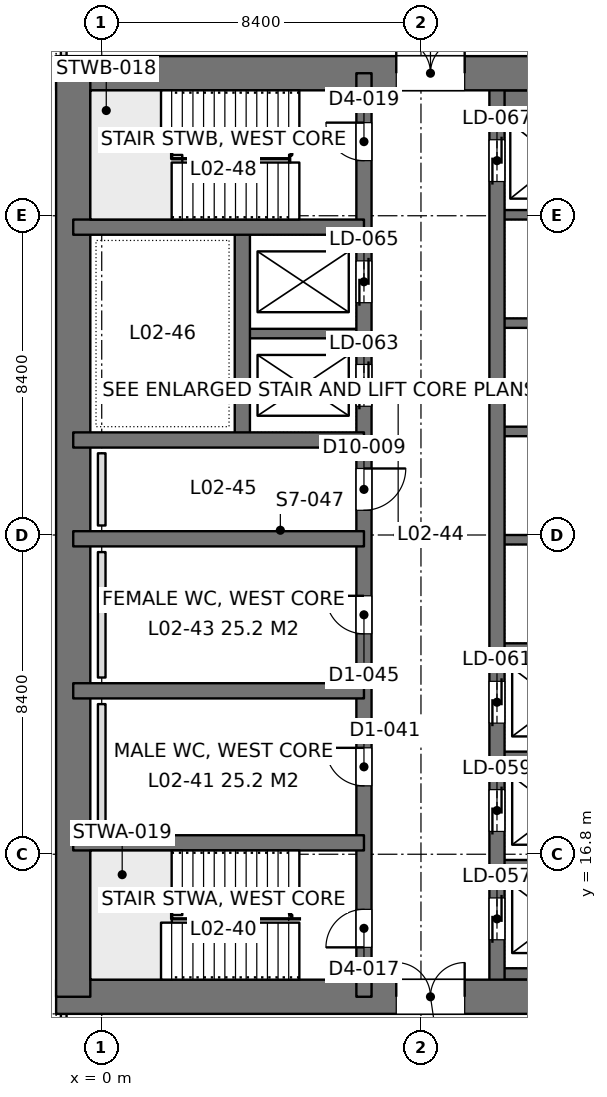
"""IFC4 building model, lengths in metres.
Left out: names, types, materials, properties, quantities, classifications, styles, units other than length and angle.
Written with IfcOpenShell. Run it as: python <this file> out.ifc"""

import sys

from ifc_helpers import new_model, si_unit, direction, frame, frame_2d, origin, place, context, subcontext, project, spatial, rectangle, extrude, element, fill, save


model = new_model("IFC4")
c1 = context("Model", 3, precision=1e-05, world=origin(), true_north=direction((0.0, 1.0)))
c2 = subcontext(c1, "Body", "Model", "MODEL_VIEW")
j1 = project(units=[si_unit("LENGTHUNIT", "METRE"), si_unit("PLANEANGLEUNIT", "RADIAN")], contexts=[c1])
p1 = place(None, origin())
s1 = spatial("IfcSite", under=j1, at=p1, CompositionType="ELEMENT")
p2 = place(p1, origin())
s2 = spatial("IfcBuilding", under=s1, at=p2, CompositionType="ELEMENT")
p3 = place(p2, frame((0.0, 0.0, 9.9)))
s3 = spatial("IfcBuildingStorey", under=s2, at=p3, CompositionType="ELEMENT", Elevation=9.9)
p4 = place(p3, frame((-1.2, 13.05, 0.0), z_axis=(0.0, 0.0, 1.0), x_axis=(1.0, 0.0, 0.0)))
e1 = element("IfcWall", 1, at=p4, inside=s3, PredefinedType="SHEAR", context=c2, shape_type="SweptSolid", body=[
    extrude(rectangle(XDim=18.0, YDim=0.9, at=frame_2d((9.0, 0.0))), origin(), (0.0, 0.0, 1.0), 4.5),
])
p5 = place(p4, frame((8.95, 0.0, 0.0)))
e2 = element("IfcOpeningElement", 2, at=p5, cuts=e1, PredefinedType="OPENING", context=c2, shape_type="SweptSolid", body=[
    extrude(rectangle(XDim=1.8, YDim=2.4, at=frame_2d((0.9, 1.2))), frame((0.0, 0.46, 0.0), z_axis=(0.0, -1.0, 0.0), x_axis=(1.0, 0.0, 0.0)), (0.0, 0.0, 1.0), 0.92),
])
p6 = place(p3, frame((-1.2, 37.35, 0.0), z_axis=(0.0, 0.0, 1.0), x_axis=(1.0, 0.0, 0.0)))
e3 = element("IfcWall", 3, at=p6, inside=s3, PredefinedType="SHEAR", context=c2, shape_type="SweptSolid", body=[
    extrude(rectangle(XDim=18.0, YDim=0.9, at=frame_2d((9.0, 0.0))), origin(), (0.0, 0.0, 1.0), 4.5),
])
p7 = place(p6, frame((8.95, 0.0, 0.0)))
e4 = element("IfcOpeningElement", 4, at=p7, cuts=e3, PredefinedType="OPENING", context=c2, shape_type="SweptSolid", body=[
    extrude(rectangle(XDim=1.8, YDim=2.4, at=frame_2d((0.9, 1.2))), frame((0.0, 0.46, 0.0), z_axis=(0.0, -1.0, 0.0), x_axis=(1.0, 0.0, 0.0)), (0.0, 0.0, 1.0), 0.92),
])
p8 = place(p3, frame((-0.75, 13.05, 0.0), z_axis=(0.0, 0.0, 1.0), x_axis=(0.0, 1.0, 0.0)))
e5 = element("IfcWall", 5, at=p8, inside=s3, PredefinedType="SHEAR", context=c2, shape_type="SweptSolid", body=[
    extrude(rectangle(XDim=24.3, YDim=0.9, at=frame_2d((12.15, 0.0))), origin(), (0.0, 0.0, 1.0), 4.5),
])
p9 = place(p3, frame((6.9, 13.05, 0.0), z_axis=(0.0, 0.0, 1.0), x_axis=(0.0, 1.0, 0.0)))
e6 = element("IfcWall", 6, at=p9, inside=s3, PredefinedType="SHEAR", context=c2, shape_type="SweptSolid", body=[
    extrude(rectangle(XDim=24.3, YDim=0.4, at=frame_2d((12.15, 0.0))), origin(), (0.0, 0.0, 1.0), 4.5),
])
p10 = place(p9, frame((1.3, 0.0, 0.0)))
e7 = element("IfcOpeningElement", 7, at=p10, cuts=e6, PredefinedType="OPENING", context=c2, shape_type="SweptSolid", body=[
    extrude(rectangle(XDim=1.0, YDim=2.2, at=frame_2d((0.5, 1.1))), frame((0.0, 0.21, 0.0), z_axis=(0.0, -1.0, 0.0), x_axis=(1.0, 0.0, 0.0)), (0.0, 0.0, 1.0), 0.42),
])
p11 = place(p9, frame((22.0, 0.0, 0.0)))
e8 = element("IfcOpeningElement", 8, at=p11, cuts=e6, PredefinedType="OPENING", context=c2, shape_type="SweptSolid", body=[
    extrude(rectangle(XDim=1.0, YDim=2.2, at=frame_2d((0.5, 1.1))), frame((0.0, 0.21, 0.0), z_axis=(0.0, -1.0, 0.0), x_axis=(1.0, 0.0, 0.0)), (0.0, 0.0, 1.0), 0.42),
])
p12 = place(p9, frame((5.55, 0.0, 0.0)))
e9 = element("IfcOpeningElement", 9, at=p12, cuts=e6, PredefinedType="OPENING", context=c2, shape_type="SweptSolid", body=[
    extrude(rectangle(XDim=1.0, YDim=2.2, at=frame_2d((0.5, 1.1))), frame((0.0, 0.21, 0.0), z_axis=(0.0, -1.0, 0.0), x_axis=(1.0, 0.0, 0.0)), (0.0, 0.0, 1.0), 0.42),
])
p13 = place(p9, frame((9.55, 0.0, 0.0)))
e10 = element("IfcOpeningElement", 10, at=p13, cuts=e6, PredefinedType="OPENING", context=c2, shape_type="SweptSolid", body=[
    extrude(rectangle(XDim=1.0, YDim=2.2, at=frame_2d((0.5, 1.1))), frame((0.0, 0.21, 0.0), z_axis=(0.0, -1.0, 0.0), x_axis=(1.0, 0.0, 0.0)), (0.0, 0.0, 1.0), 0.42),
])
p14 = place(p9, frame((12.8, 0.0, 0.0)))
e11 = element("IfcOpeningElement", 11, at=p14, cuts=e6, PredefinedType="OPENING", context=c2, shape_type="SweptSolid", body=[
    extrude(rectangle(XDim=1.1, YDim=2.2, at=frame_2d((0.55, 1.1))), frame((0.0, 0.21, 0.0), z_axis=(0.0, -1.0, 0.0), x_axis=(1.0, 0.0, 0.0)), (0.0, 0.0, 1.0), 0.42),
])
p15 = place(p9, frame((15.538, 0.0, 0.0)))
e12 = element("IfcOpeningElement", 12, at=p15, cuts=e6, PredefinedType="OPENING", context=c2, shape_type="SweptSolid", body=[
    extrude(rectangle(XDim=1.1, YDim=2.2, at=frame_2d((0.55, 1.1))), frame((0.0, 0.21, 0.0), z_axis=(0.0, -1.0, 0.0), x_axis=(1.0, 0.0, 0.0)), (0.0, 0.0, 1.0), 0.42),
])
p16 = place(p9, frame((18.262, 0.0, 0.0)))
e13 = element("IfcOpeningElement", 13, at=p16, cuts=e6, PredefinedType="OPENING", context=c2, shape_type="SweptSolid", body=[
    extrude(rectangle(XDim=1.1, YDim=2.2, at=frame_2d((0.55, 1.1))), frame((0.0, 0.21, 0.0), z_axis=(0.0, -1.0, 0.0), x_axis=(1.0, 0.0, 0.0)), (0.0, 0.0, 1.0), 0.42),
])
p17 = place(p3, frame((10.4, 13.05, 0.0), z_axis=(0.0, 0.0, 1.0), x_axis=(0.0, 1.0, 0.0)))
e14 = element("IfcWall", 14, at=p17, inside=s3, PredefinedType="SHEAR", context=c2, shape_type="SweptSolid", body=[
    extrude(rectangle(XDim=24.3, YDim=0.4, at=frame_2d((12.15, 0.0))), origin(), (0.0, 0.0, 1.0), 4.5),
])
p18 = place(p17, frame((1.5, 0.0, 0.0)))
e15 = element("IfcOpeningElement", 15, at=p18, cuts=e14, PredefinedType="OPENING", context=c2, shape_type="SweptSolid", body=[
    extrude(rectangle(XDim=1.1, YDim=2.2, at=frame_2d((0.55, 1.1))), frame((0.0, 0.21, 0.0), z_axis=(0.0, -1.0, 0.0), x_axis=(1.0, 0.0, 0.0)), (0.0, 0.0, 1.0), 0.42),
])
p19 = place(p17, frame((4.35, 0.0, 0.0)))
e16 = element("IfcOpeningElement", 16, at=p19, cuts=e14, PredefinedType="OPENING", context=c2, shape_type="SweptSolid", body=[
    extrude(rectangle(XDim=1.1, YDim=2.2, at=frame_2d((0.55, 1.1))), frame((0.0, 0.21, 0.0), z_axis=(0.0, -1.0, 0.0), x_axis=(1.0, 0.0, 0.0)), (0.0, 0.0, 1.0), 0.42),
])
p20 = place(p17, frame((7.2, 0.0, 0.0)))
e17 = element("IfcOpeningElement", 17, at=p20, cuts=e14, PredefinedType="OPENING", context=c2, shape_type="SweptSolid", body=[
    extrude(rectangle(XDim=1.1, YDim=2.2, at=frame_2d((0.55, 1.1))), frame((0.0, 0.21, 0.0), z_axis=(0.0, -1.0, 0.0), x_axis=(1.0, 0.0, 0.0)), (0.0, 0.0, 1.0), 0.42),
])
p21 = place(p17, frame((21.45, 0.0, 0.0)))
e18 = element("IfcOpeningElement", 18, at=p21, cuts=e14, PredefinedType="OPENING", context=c2, shape_type="SweptSolid", body=[
    extrude(rectangle(XDim=1.1, YDim=2.2, at=frame_2d((0.55, 1.1))), frame((0.0, 0.21, 0.0), z_axis=(0.0, -1.0, 0.0), x_axis=(1.0, 0.0, 0.0)), (0.0, 0.0, 1.0), 0.42),
])
for number, where, z_axis, x_axis in (
    (19, (-0.75, 17.1, 0.0), (0.0, 0.0, 1.0), (1.0, 0.0, 0.0)),
    (20, (-0.75, 21.1, 0.0), (0.0, 0.0, 1.0), (1.0, 0.0, 0.0)),
    (21, (-0.75, 25.1, 0.0), (0.0, 0.0, 1.0), (1.0, 0.0, 0.0)),
    (22, (-0.75, 27.7, 0.0), (0.0, 0.0, 1.0), (1.0, 0.0, 0.0)),
    (23, (-0.75, 33.3, 0.0), (0.0, 0.0, 1.0), (1.0, 0.0, 0.0)),
):
    element("IfcWall", number, at=place(p3, frame(where, z_axis=z_axis, x_axis=x_axis)), inside=s3, PredefinedType="SHEAR", context=c2, shape_type="SweptSolid", body=[
        extrude(rectangle(XDim=7.65, YDim=0.4, at=frame_2d((3.825, 0.0))), origin(), (0.0, 0.0, 1.0), 4.5),
    ])
p22 = place(p3, frame((3.7, 27.7, 0.0), z_axis=(0.0, 0.0, 1.0), x_axis=(0.0, 1.0, 0.0)))
e24 = element("IfcWall", 24, at=p22, inside=s3, PredefinedType="SHEAR", context=c2, shape_type="SweptSolid", body=[
    extrude(rectangle(XDim=5.6, YDim=0.4, at=frame_2d((2.8, 0.0))), origin(), (0.0, 0.0, 1.0), 4.5),
])
p23 = place(p3, frame((3.7, 30.5, 0.0), z_axis=(0.0, 0.0, 1.0), x_axis=(1.0, 0.0, 0.0)))
e25 = element("IfcWall", 25, at=p23, inside=s3, PredefinedType="SHEAR", context=c2, shape_type="SweptSolid", body=[
    extrude(rectangle(XDim=3.2, YDim=0.25, at=frame_2d((1.6, 0.0))), origin(), (0.0, 0.0, 1.0), 4.5),
])
p24 = place(p3, frame((10.4, 13.65, 0.0), z_axis=(0.0, 0.0, 1.0), x_axis=(1.0, 0.0, 0.0)))
e26 = element("IfcWall", 26, at=p24, inside=s3, PredefinedType="SHEAR", context=c2, shape_type="SweptSolid", body=[
    extrude(rectangle(XDim=3.2, YDim=0.3, at=frame_2d((1.6, 0.0))), origin(), (0.0, 0.0, 1.0), 4.5),
])
for number, where, z_axis, x_axis in (
    (27, (10.4, 16.525, 0.0), (0.0, 0.0, 1.0), (1.0, 0.0, 0.0)),
    (28, (10.4, 19.375, 0.0), (0.0, 0.0, 1.0), (1.0, 0.0, 0.0)),
    (29, (10.4, 22.225, 0.0), (0.0, 0.0, 1.0), (1.0, 0.0, 0.0)),
    (30, (10.4, 25.075, 0.0), (0.0, 0.0, 1.0), (1.0, 0.0, 0.0)),
    (31, (10.4, 27.925, 0.0), (0.0, 0.0, 1.0), (1.0, 0.0, 0.0)),
    (32, (10.4, 30.775, 0.0), (0.0, 0.0, 1.0), (1.0, 0.0, 0.0)),
    (33, (10.4, 33.625, 0.0), (0.0, 0.0, 1.0), (1.0, 0.0, 0.0)),
):
    element("IfcWall", number, at=place(p3, frame(where, z_axis=z_axis, x_axis=x_axis)), inside=s3, PredefinedType="SHEAR", context=c2, shape_type="SweptSolid", body=[
        extrude(rectangle(XDim=3.2, YDim=0.25, at=frame_2d((1.6, 0.0))), origin(), (0.0, 0.0, 1.0), 4.5),
    ])
p25 = place(p3, frame((10.4, 36.625, 0.0), z_axis=(0.0, 0.0, 1.0), x_axis=(1.0, 0.0, 0.0)))
e34 = element("IfcWall", 34, at=p25, inside=s3, PredefinedType="SHEAR", context=c2, shape_type="SweptSolid", body=[
    extrude(rectangle(XDim=3.2, YDim=0.55, at=frame_2d((1.6, 0.0))), origin(), (0.0, 0.0, 1.0), 4.5),
])
p26 = place(p3, frame((-1.0, -0.926, 0.0), z_axis=(0.0, 0.0, 1.0), x_axis=(0.0, 1.0, 0.0)))
e35 = element("IfcWall", 35, at=p26, inside=s3, PredefinedType="PARTITIONING", context=c2, shape_type="SweptSolid", body=[
    extrude(rectangle(XDim=13.528, YDim=0.15, at=frame_2d((6.764, 0.0))), origin(), (0.0, 0.0, 1.0), 3.65),
])
p27 = place(p26, frame((4.626, 0.0, 0.0)))
e36 = element("IfcOpeningElement", 36, at=p27, cuts=e35, PredefinedType="OPENING", context=c2, shape_type="SweptSolid", body=[
    extrude(rectangle(XDim=1.0, YDim=2.2, at=frame_2d((0.5, 1.1))), frame((0.0, 0.085, 0.0), z_axis=(0.0, -1.0, 0.0), x_axis=(1.0, 0.0, 0.0)), (0.0, 0.0, 1.0), 0.17),
])
p28 = place(p3, frame((-1.0, 37.8, 0.0), z_axis=(0.0, 0.0, 1.0), x_axis=(0.0, 1.0, 0.0)))
e37 = element("IfcWall", 37, at=p28, inside=s3, PredefinedType="PARTITIONING", context=c2, shape_type="SweptSolid", body=[
    extrude(rectangle(XDim=6.48, YDim=0.15, at=frame_2d((3.24, 0.0))), origin(), (0.0, 0.0, 1.0), 3.65),
])
p29 = place(p28, frame((1.6, 0.0, 0.0)))
e38 = element("IfcOpeningElement", 38, at=p29, cuts=e37, PredefinedType="OPENING", context=c2, shape_type="SweptSolid", body=[
    extrude(rectangle(XDim=1.0, YDim=2.2, at=frame_2d((0.5, 1.1))), frame((0.0, 0.085, 0.0), z_axis=(0.0, -1.0, 0.0), x_axis=(1.0, 0.0, 0.0)), (0.0, 0.0, 1.0), 0.17),
])
for number, where, z_axis, x_axis in (
    (39, (0.0, 17.45, 0.0), (0.0, 0.0, 1.0), (0.0, 1.0, 0.0)),
    (40, (0.0, 21.45, 0.0), (0.0, 0.0, 1.0), (0.0, 1.0, 0.0)),
):
    element("IfcWall", number, at=place(p3, frame(where, z_axis=z_axis, x_axis=x_axis)), inside=s3, PredefinedType="PLUMBINGWALL", context=c2, shape_type="SweptSolid", body=[
        extrude(rectangle(XDim=3.3, YDim=0.2, at=frame_2d((1.65, 0.0))), origin(), (0.0, 0.0, 1.0), 1.2),
    ])
p30 = place(p3, frame((0.0, 25.45, 0.0), z_axis=(0.0, 0.0, 1.0), x_axis=(0.0, 1.0, 0.0)))
e41 = element("IfcWall", 41, at=p30, inside=s3, PredefinedType="PLUMBINGWALL", context=c2, shape_type="SweptSolid", body=[
    extrude(rectangle(XDim=1.9, YDim=0.2, at=frame_2d((0.95, 0.0))), origin(), (0.0, 0.0, 1.0), 1.2),
])
p31 = place(p5, origin())
e42 = element("IfcDoor", 42, at=p31, inside=s3, OperationType="DOUBLE_DOOR_SINGLE_SWING", PredefinedType="DOOR", context=c2, shape_type="SweptSolid", body=[
    extrude(rectangle(XDim=1.8, YDim=2.4, at=frame_2d((0.9, 1.2))), frame((0.0, 0.025, 0.0), z_axis=(0.0, -1.0, 0.0), x_axis=(1.0, 0.0, 0.0)), (0.0, 0.0, 1.0), 0.05),
])
fill(e2, e42)
p32 = place(p7, origin())
e43 = element("IfcDoor", 43, at=p32, inside=s3, OperationType="DOUBLE_DOOR_SINGLE_SWING", PredefinedType="DOOR", context=c2, shape_type="SweptSolid", body=[
    extrude(rectangle(XDim=1.8, YDim=2.4, at=frame_2d((0.9, 1.2))), frame((0.0, 0.025, 0.0), z_axis=(0.0, -1.0, 0.0), x_axis=(1.0, 0.0, 0.0)), (0.0, 0.0, 1.0), 0.05),
])
fill(e4, e43)
p33 = place(p10, origin())
e44 = element("IfcDoor", 44, at=p33, inside=s3, OperationType="SINGLE_SWING_LEFT", PredefinedType="DOOR", context=c2, shape_type="SweptSolid", body=[
    extrude(rectangle(XDim=1.0, YDim=2.2, at=frame_2d((0.5, 1.1))), frame((0.0, 0.025, 0.0), z_axis=(0.0, -1.0, 0.0), x_axis=(1.0, 0.0, 0.0)), (0.0, 0.0, 1.0), 0.05),
])
fill(e7, e44)
p34 = place(p11, origin())
e45 = element("IfcDoor", 45, at=p34, inside=s3, OperationType="SINGLE_SWING_RIGHT", PredefinedType="DOOR", context=c2, shape_type="SweptSolid", body=[
    extrude(rectangle(XDim=1.0, YDim=2.2, at=frame_2d((0.5, 1.1))), frame((0.0, 0.025, 0.0), z_axis=(0.0, -1.0, 0.0), x_axis=(1.0, 0.0, 0.0)), (0.0, 0.0, 1.0), 0.05),
])
fill(e8, e45)
p35 = place(p12, origin())
e46 = element("IfcDoor", 46, at=p35, inside=s3, OperationType="SINGLE_SWING_RIGHT", PredefinedType="DOOR", context=c2, shape_type="SweptSolid", body=[
    extrude(rectangle(XDim=1.0, YDim=2.2, at=frame_2d((0.5, 1.1))), frame((0.0, 0.025, 0.0), z_axis=(0.0, -1.0, 0.0), x_axis=(1.0, 0.0, 0.0)), (0.0, 0.0, 1.0), 0.05),
])
fill(e9, e46)
p36 = place(p13, origin())
e47 = element("IfcDoor", 47, at=p36, inside=s3, OperationType="SINGLE_SWING_RIGHT", PredefinedType="DOOR", context=c2, shape_type="SweptSolid", body=[
    extrude(rectangle(XDim=1.0, YDim=2.2, at=frame_2d((0.5, 1.1))), frame((0.0, 0.025, 0.0), z_axis=(0.0, -1.0, 0.0), x_axis=(1.0, 0.0, 0.0)), (0.0, 0.0, 1.0), 0.05),
])
fill(e10, e47)
p37 = place(p14, frame((1.1, 0.0, 0.0), z_axis=(0.0, 0.0, 1.0), x_axis=(-1.0, 0.0, 0.0)))
e48 = element("IfcDoor", 48, at=p37, inside=s3, OperationType="SINGLE_SWING_LEFT", PredefinedType="DOOR", context=c2, shape_type="SweptSolid", body=[
    extrude(rectangle(XDim=1.1, YDim=2.2, at=frame_2d((0.55, 1.1))), frame((0.0, 0.025, 0.0), z_axis=(0.0, -1.0, 0.0), x_axis=(1.0, 0.0, 0.0)), (0.0, 0.0, 1.0), 0.05),
])
fill(e11, e48)
p38 = place(p18, origin())
e49 = element("IfcDoor", 49, at=p38, inside=s3, OperationType="DOUBLE_DOOR_SLIDING", PredefinedType="DOOR", context=c2, shape_type="SweptSolid", body=[
    extrude(rectangle(XDim=1.1, YDim=2.2, at=frame_2d((0.55, 1.1))), frame((0.0, 0.025, 0.0), z_axis=(0.0, -1.0, 0.0), x_axis=(1.0, 0.0, 0.0)), (0.0, 0.0, 1.0), 0.05),
])
fill(e15, e49)
p39 = place(p19, origin())
e50 = element("IfcDoor", 50, at=p39, inside=s3, OperationType="DOUBLE_DOOR_SLIDING", PredefinedType="DOOR", context=c2, shape_type="SweptSolid", body=[
    extrude(rectangle(XDim=1.1, YDim=2.2, at=frame_2d((0.55, 1.1))), frame((0.0, 0.025, 0.0), z_axis=(0.0, -1.0, 0.0), x_axis=(1.0, 0.0, 0.0)), (0.0, 0.0, 1.0), 0.05),
])
fill(e16, e50)
p40 = place(p20, origin())
e51 = element("IfcDoor", 51, at=p40, inside=s3, OperationType="DOUBLE_DOOR_SLIDING", PredefinedType="DOOR", context=c2, shape_type="SweptSolid", body=[
    extrude(rectangle(XDim=1.1, YDim=2.2, at=frame_2d((0.55, 1.1))), frame((0.0, 0.025, 0.0), z_axis=(0.0, -1.0, 0.0), x_axis=(1.0, 0.0, 0.0)), (0.0, 0.0, 1.0), 0.05),
])
fill(e17, e51)
p41 = place(p21, origin())
e52 = element("IfcDoor", 52, at=p41, inside=s3, OperationType="DOUBLE_DOOR_SLIDING", PredefinedType="DOOR", context=c2, shape_type="SweptSolid", body=[
    extrude(rectangle(XDim=1.1, YDim=2.2, at=frame_2d((0.55, 1.1))), frame((0.0, 0.025, 0.0), z_axis=(0.0, -1.0, 0.0), x_axis=(1.0, 0.0, 0.0)), (0.0, 0.0, 1.0), 0.05),
])
fill(e18, e52)
p42 = place(p15, origin())
e53 = element("IfcDoor", 53, at=p42, inside=s3, OperationType="DOUBLE_DOOR_SLIDING", PredefinedType="DOOR", context=c2, shape_type="SweptSolid", body=[
    extrude(rectangle(XDim=1.1, YDim=2.2, at=frame_2d((0.55, 1.1))), frame((0.0, 0.025, 0.0), z_axis=(0.0, -1.0, 0.0), x_axis=(1.0, 0.0, 0.0)), (0.0, 0.0, 1.0), 0.05),
])
fill(e12, e53)
p43 = place(p16, origin())
e54 = element("IfcDoor", 54, at=p43, inside=s3, OperationType="DOUBLE_DOOR_SLIDING", PredefinedType="DOOR", context=c2, shape_type="SweptSolid", body=[
    extrude(rectangle(XDim=1.1, YDim=2.2, at=frame_2d((0.55, 1.1))), frame((0.0, 0.025, 0.0), z_axis=(0.0, -1.0, 0.0), x_axis=(1.0, 0.0, 0.0)), (0.0, 0.0, 1.0), 0.05),
])
fill(e13, e54)
save(model, sys.argv[1])
